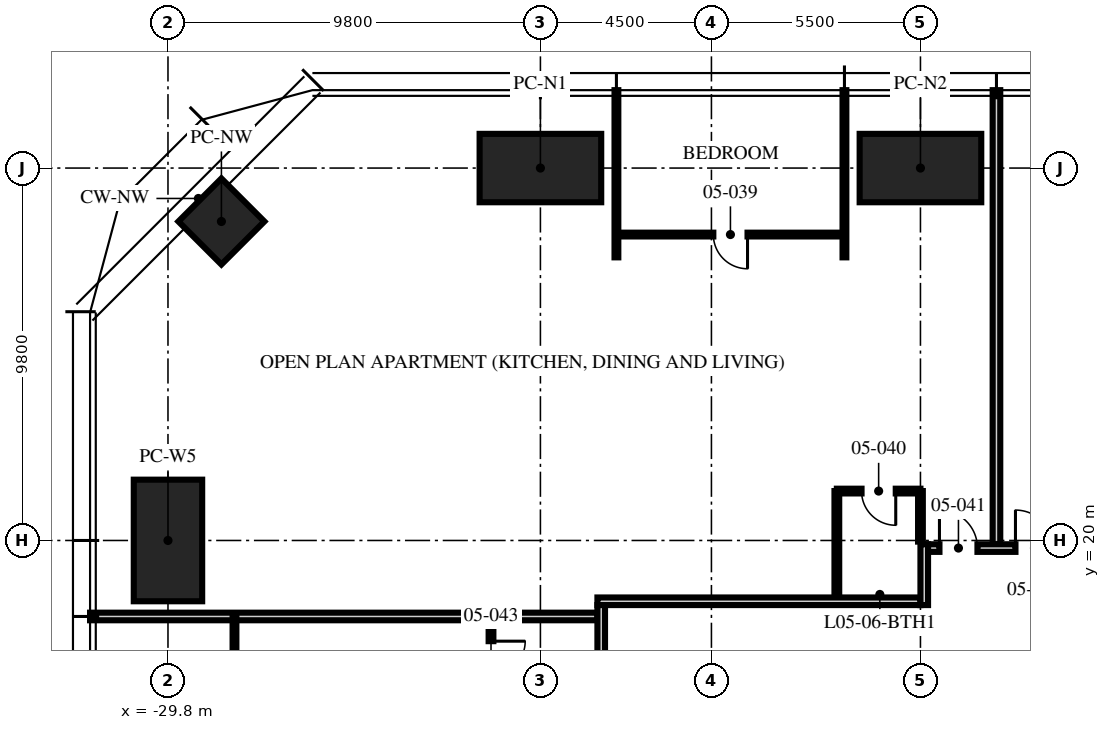
"""IFC4 building model, lengths in metres.
Left out: names, types, materials, properties, quantities, classifications, styles, units other than length and angle.
Written with IfcOpenShell. Run it as: python <this file> out.ifc"""

import sys

from ifc_helpers import new_model, si_unit, direction, frame, frame_2d, origin, origin_2d, place, context, subcontext, project, spatial, rectangle, hollow_rectangle, extrude, element, fill, save


model = new_model("IFC4")
c1 = context("Model", 3, precision=1e-05, world=origin(), true_north=direction((0.0, 1.0)))
c2 = subcontext(c1, "Body", "Model", "MODEL_VIEW")
j1 = project(units=[si_unit("LENGTHUNIT", "METRE"), si_unit("PLANEANGLEUNIT", "RADIAN")], contexts=[c1])
p1 = place(None, origin())
s1 = spatial("IfcSite", under=j1, at=p1, CompositionType="ELEMENT")
p2 = place(p1, origin())
s2 = spatial("IfcBuilding", under=s1, at=p2, CompositionType="ELEMENT")
p3 = place(p2, frame((0.0, 0.0, 24.75)))
s3 = spatial("IfcBuildingStorey", under=s2, at=p3, CompositionType="ELEMENT", Elevation=24.75)
for number, where, z_axis, x_axis in (
    (1, (-20.0, 29.8, 0.0), (0.0, 0.0, 1.0), (1.0, 0.0, 0.0)),
    (2, (-10.0, 29.8, 0.0), (0.0, 0.0, 1.0), (1.0, 0.0, 0.0)),
    (3, (-29.8, 20.0, 0.0), (0.0, 0.0, 1.0), (0.0, 1.0, 0.0)),
):
    element("IfcColumn", number, at=place(p3, frame(where, z_axis=z_axis, x_axis=x_axis)), inside=s3, PredefinedType="COLUMN", context=c2, shape_type="SweptSolid", body=[
        extrude(hollow_rectangle(XDim=3.2, YDim=1.8, WallThickness=0.2, at=origin_2d()), origin(), (0.0, 0.0, 1.0), 3.75),
    ])
p4 = place(p3, frame((-28.394, 28.394, 0.0), z_axis=(0.0, 0.0, 1.0), x_axis=(0.707106781187, 0.707106781187, 0.0)))
e4 = element("IfcColumn", 4, at=p4, inside=s3, PredefinedType="COLUMN", context=c2, shape_type="SweptSolid", body=[
    extrude(hollow_rectangle(XDim=1.6, YDim=1.6, WallThickness=0.1, at=origin_2d()), origin(), (0.0, 0.0, 1.0), 3.75),
])
p5 = place(p3, frame((-8.0, 19.9, 0.0), z_axis=(0.0, 0.0, 1.0), x_axis=(0.0, 1.0, 0.0)))
e5 = element("IfcWall", 5, at=p5, inside=s3, PredefinedType="PARTITIONING", context=c2, shape_type="SweptSolid", body=[
    extrude(rectangle(XDim=11.95, YDim=0.2, at=frame_2d((5.975, 0.0))), origin(), (0.0, 0.0, 1.0), 2.71),
])
for number, where, z_axis, x_axis in (
    (6, (-12.0, 27.45, 0.0), (0.0, 0.0, 1.0), (0.0, 1.0, 0.0)),
    (7, (-18.0, 27.45, 0.0), (0.0, 0.0, 1.0), (0.0, 1.0, 0.0)),
):
    element("IfcWall", number, at=place(p3, frame(where, z_axis=z_axis, x_axis=x_axis)), inside=s3, PredefinedType="PARTITIONING", context=c2, shape_type="SweptSolid", body=[
        extrude(rectangle(XDim=4.4, YDim=0.1, at=frame_2d((2.2, 0.0))), origin(), (0.0, 0.0, 1.0), 2.71),
    ])
p6 = place(p3, frame((-18.5, 18.0, 0.0), z_axis=(0.0, 0.0, 1.0), x_axis=(-1.0, 0.0, 0.0)))
e8 = element("IfcWall", 8, at=p6, inside=s3, PredefinedType="PARTITIONING", context=c2, shape_type="SweptSolid", body=[
    extrude(rectangle(XDim=13.35, YDim=0.2, at=frame_2d((6.675, 0.0))), origin(), (0.0, 0.0, 1.0), 2.3),
])
p7 = place(p3, frame((-12.0, 28.05, 0.0), z_axis=(0.0, 0.0, 1.0), x_axis=(-1.0, 0.0, 0.0)))
e9 = element("IfcWall", 9, at=p7, inside=s3, PredefinedType="PARTITIONING", context=c2, shape_type="SweptSolid", body=[
    extrude(rectangle(XDim=6.0, YDim=0.1, at=frame_2d((3.0, 0.0))), origin(), (0.0, 0.0, 1.0), 2.61),
])
p8 = place(p7, frame((2.55, 0.0, 0.0)))
e10 = element("IfcOpeningElement", 10, at=p8, cuts=e9, PredefinedType="OPENING", context=c2, shape_type="SweptSolid", body=[
    extrude(rectangle(XDim=0.9, YDim=2.1, at=frame_2d((0.45, 1.05))), frame((0.0, 0.06, 0.0), z_axis=(0.0, -1.0, 0.0), x_axis=(1.0, 0.0, 0.0)), (0.0, 0.0, 1.0), 0.12),
])
p9 = place(p3, frame((-10.0, 21.3, 0.0), z_axis=(0.0, 0.0, 1.0), x_axis=(-1.0, 0.0, 0.0)))
e11 = element("IfcWall", 11, at=p9, inside=s3, PredefinedType="PARTITIONING", context=c2, shape_type="SweptSolid", body=[
    extrude(rectangle(XDim=2.2, YDim=0.125, at=frame_2d((1.1, 0.0))), origin(), (0.0, 0.0, 1.0), 2.492),
])
p10 = place(p9, frame((0.65, 0.0, 0.0)))
e12 = element("IfcOpeningElement", 12, at=p10, cuts=e11, PredefinedType="OPENING", context=c2, shape_type="SweptSolid", body=[
    extrude(rectangle(XDim=0.9, YDim=2.1, at=frame_2d((0.45, 1.05))), frame((0.0, 0.073, 0.0), z_axis=(0.0, -1.0, 0.0), x_axis=(1.0, 0.0, 0.0)), (0.0, 0.0, 1.0), 0.145),
])
p11 = place(p3, frame((-10.0, 19.97, 0.0), z_axis=(0.0, 0.0, 1.0), x_axis=(0.0, 1.0, 0.0)))
e13 = element("IfcWall", 13, at=p11, inside=s3, PredefinedType="PARTITIONING", context=c2, shape_type="SweptSolid", body=[
    extrude(rectangle(XDim=1.33, YDim=0.125, at=frame_2d((0.665, 0.0))), origin(), (0.0, 0.0, 1.0), 2.492),
])
p12 = place(p3, frame((-12.2, 18.5, 0.0), z_axis=(0.0, 0.0, 1.0), x_axis=(0.0, 1.0, 0.0)))
e14 = element("IfcWall", 14, at=p12, inside=s3, PredefinedType="PARTITIONING", context=c2, shape_type="SweptSolid", body=[
    extrude(rectangle(XDim=2.8, YDim=0.125, at=frame_2d((1.4, 0.0))), origin(), (0.0, 0.0, 1.0), 3.5),
])
p13 = place(p3, frame((-28.05, 18.0, 0.0), z_axis=(0.0, 0.0, 1.0), x_axis=(0.0, -1.0, 0.0)))
e15 = element("IfcWall", 15, at=p13, inside=s3, PredefinedType="PARTITIONING", context=c2, shape_type="SweptSolid", body=[
    extrude(rectangle(XDim=6.0, YDim=0.1, at=frame_2d((3.0, 0.0))), origin(), (0.0, 0.0, 1.0), 2.61),
])
p14 = place(p13, frame((2.55, 0.0, 0.0)))
e16 = element("IfcOpeningElement", 16, at=p14, cuts=e15, PredefinedType="OPENING", context=c2, shape_type="SweptSolid", body=[
    extrude(rectangle(XDim=0.9, YDim=2.1, at=frame_2d((0.45, 1.05))), frame((0.0, 0.06, 0.0), z_axis=(0.0, -1.0, 0.0), x_axis=(1.0, 0.0, 0.0)), (0.0, 0.0, 1.0), 0.12),
])
p15 = place(p3, frame((-21.3, 18.0, 0.0), z_axis=(0.0, 0.0, 1.0), x_axis=(0.0, -1.0, 0.0)))
e17 = element("IfcWall", 17, at=p15, inside=s3, PredefinedType="PARTITIONING", context=c2, shape_type="SweptSolid", body=[
    extrude(rectangle(XDim=2.2, YDim=0.125, at=frame_2d((1.1, 0.0))), origin(), (0.0, 0.0, 1.0), 3.5),
])
p16 = place(p15, frame((0.65, 0.0, 0.0)))
e18 = element("IfcOpeningElement", 18, at=p16, cuts=e17, PredefinedType="OPENING", context=c2, shape_type="SweptSolid", body=[
    extrude(rectangle(XDim=0.9, YDim=2.1, at=frame_2d((0.45, 1.05))), frame((0.0, 0.073, 0.0), z_axis=(0.0, -1.0, 0.0), x_axis=(1.0, 0.0, 0.0)), (0.0, 0.0, 1.0), 0.145),
])
p17 = place(p3, frame((-18.5, 18.4, 0.0), z_axis=(0.0, 0.0, 1.0), x_axis=(1.0, 0.0, 0.0)))
e19 = element("IfcWall", 19, at=p17, inside=s3, PredefinedType="PARTITIONING", context=c2, shape_type="SweptSolid", body=[
    extrude(rectangle(XDim=8.5, YDim=0.2, at=frame_2d((4.25, 0.0))), origin(), (0.0, 0.0, 1.0), 2.3),
])
p18 = place(p3, frame((-9.9, 18.3, 0.0), z_axis=(0.0, 0.0, 1.0), x_axis=(0.0, 1.0, 0.0)))
e20 = element("IfcWall", 20, at=p18, inside=s3, PredefinedType="PARTITIONING", context=c2, shape_type="SweptSolid", body=[
    extrude(rectangle(XDim=1.6, YDim=0.2, at=frame_2d((0.8, 0.0))), origin(), (0.0, 0.0, 1.0), 2.492),
])
p19 = place(p3, frame((-9.8, 19.8, 0.0), z_axis=(0.0, 0.0, 1.0), x_axis=(1.0, 0.0, 0.0)))
e21 = element("IfcWall", 21, at=p19, inside=s3, PredefinedType="PARTITIONING", context=c2, shape_type="SweptSolid", body=[
    extrude(rectangle(XDim=3.6, YDim=0.2, at=frame_2d((1.8, 0.0))), origin(), (0.0, 0.0, 1.0), 3.5),
])
p20 = place(p19, frame((2.3, 0.0, 0.0)))
e22 = element("IfcOpeningElement", 22, at=p20, cuts=e21, PredefinedType="OPENING", context=c2, shape_type="SweptSolid", body=[
    extrude(rectangle(XDim=1.0, YDim=2.2, at=frame_2d((0.5, 1.1))), frame((0.0, 0.11, 0.0), z_axis=(0.0, -1.0, 0.0), x_axis=(1.0, 0.0, 0.0)), (0.0, 0.0, 1.0), 0.22),
])
p21 = place(p19, frame((0.3, 0.0, 0.0)))
e23 = element("IfcOpeningElement", 23, at=p21, cuts=e21, PredefinedType="OPENING", context=c2, shape_type="SweptSolid", body=[
    extrude(rectangle(XDim=1.0, YDim=2.2, at=frame_2d((0.5, 1.1))), frame((0.0, 0.11, 0.0), z_axis=(0.0, -1.0, 0.0), x_axis=(1.0, 0.0, 0.0)), (0.0, 0.0, 1.0), 0.22),
])
p22 = place(p3, frame((-18.4, 18.3, 0.0), z_axis=(0.0, 0.0, 1.0), x_axis=(0.0, -1.0, 0.0)))
e24 = element("IfcWall", 24, at=p22, inside=s3, PredefinedType="PARTITIONING", context=c2, shape_type="SweptSolid", body=[
    extrude(rectangle(XDim=36.6, YDim=0.2, at=frame_2d((18.3, 0.0))), origin(), (0.0, 0.0, 1.0), 2.3),
])
p23 = place(p22, frame((8.57, 0.0, 0.0)))
e25 = element("IfcOpeningElement", 25, at=p23, cuts=e24, PredefinedType="OPENING", context=c2, shape_type="SweptSolid", body=[
    extrude(rectangle(XDim=1.0, YDim=2.2, at=frame_2d((0.5, 1.1))), frame((0.0, 0.11, 0.0), z_axis=(0.0, -1.0, 0.0), x_axis=(1.0, 0.0, 0.0)), (0.0, 0.0, 1.0), 0.22),
])
p24 = place(p22, frame((24.57, 0.0, 0.0)))
e26 = element("IfcOpeningElement", 26, at=p24, cuts=e24, PredefinedType="OPENING", context=c2, shape_type="SweptSolid", body=[
    extrude(rectangle(XDim=1.0, YDim=2.2, at=frame_2d((0.5, 1.1))), frame((0.0, 0.11, 0.0), z_axis=(0.0, -1.0, 0.0), x_axis=(1.0, 0.0, 0.0)), (0.0, 0.0, 1.0), 0.22),
])
p25 = place(p22, frame((28.87, 0.0, 0.0)))
e27 = element("IfcOpeningElement", 27, at=p25, cuts=e24, PredefinedType="OPENING", context=c2, shape_type="SweptSolid", body=[
    extrude(rectangle(XDim=1.0, YDim=2.2, at=frame_2d((0.5, 1.1))), frame((0.0, 0.11, 0.0), z_axis=(0.0, -1.0, 0.0), x_axis=(1.0, 0.0, 0.0)), (0.0, 0.0, 1.0), 0.22),
])
p26 = place(p22, frame((34.82, 0.0, 0.0)))
e28 = element("IfcOpeningElement", 28, at=p26, cuts=e24, PredefinedType="OPENING", context=c2, shape_type="SweptSolid", body=[
    extrude(rectangle(XDim=1.0, YDim=2.2, at=frame_2d((0.5, 1.1))), frame((0.0, 0.11, 0.0), z_axis=(0.0, -1.0, 0.0), x_axis=(1.0, 0.0, 0.0)), (0.0, 0.0, 1.0), 0.22),
])
p27 = place(p20, origin())
e29 = element("IfcDoor", 29, at=p27, inside=s3, OperationType="SINGLE_SWING_LEFT", PredefinedType="DOOR", context=c2, shape_type="SweptSolid", body=[
    extrude(rectangle(XDim=1.0, YDim=2.2, at=frame_2d((0.5, 1.1))), frame((0.0, 0.025, 0.0), z_axis=(0.0, -1.0, 0.0), x_axis=(1.0, 0.0, 0.0)), (0.0, 0.0, 1.0), 0.05),
])
fill(e22, e29)
p28 = place(p8, origin())
e30 = element("IfcDoor", 30, at=p28, inside=s3, OperationType="SINGLE_SWING_LEFT", PredefinedType="DOOR", context=c2, shape_type="SweptSolid", body=[
    extrude(rectangle(XDim=0.9, YDim=2.1, at=frame_2d((0.45, 1.05))), frame((0.0, 0.025, 0.0), z_axis=(0.0, -1.0, 0.0), x_axis=(1.0, 0.0, 0.0)), (0.0, 0.0, 1.0), 0.05),
])
fill(e10, e30)
p29 = place(p10, origin())
e31 = element("IfcDoor", 31, at=p29, inside=s3, OperationType="SINGLE_SWING_LEFT", PredefinedType="DOOR", context=c2, shape_type="SweptSolid", body=[
    extrude(rectangle(XDim=0.9, YDim=2.1, at=frame_2d((0.45, 1.05))), frame((0.0, 0.025, 0.0), z_axis=(0.0, -1.0, 0.0), x_axis=(1.0, 0.0, 0.0)), (0.0, 0.0, 1.0), 0.05),
])
fill(e12, e31)
p30 = place(p21, origin())
e32 = element("IfcDoor", 32, at=p30, inside=s3, OperationType="SINGLE_SWING_LEFT", PredefinedType="DOOR", context=c2, shape_type="SweptSolid", body=[
    extrude(rectangle(XDim=1.0, YDim=2.2, at=frame_2d((0.5, 1.1))), frame((0.0, 0.025, 0.0), z_axis=(0.0, -1.0, 0.0), x_axis=(1.0, 0.0, 0.0)), (0.0, 0.0, 1.0), 0.05),
])
fill(e23, e32)
p31 = place(p16, origin())
e33 = element("IfcDoor", 33, at=p31, inside=s3, OperationType="SINGLE_SWING_LEFT", PredefinedType="DOOR", context=c2, shape_type="SweptSolid", body=[
    extrude(rectangle(XDim=0.9, YDim=2.1, at=frame_2d((0.45, 1.05))), frame((0.0, 0.025, 0.0), z_axis=(0.0, -1.0, 0.0), x_axis=(1.0, 0.0, 0.0)), (0.0, 0.0, 1.0), 0.05),
])
fill(e18, e33)
save(model, sys.argv[1])
